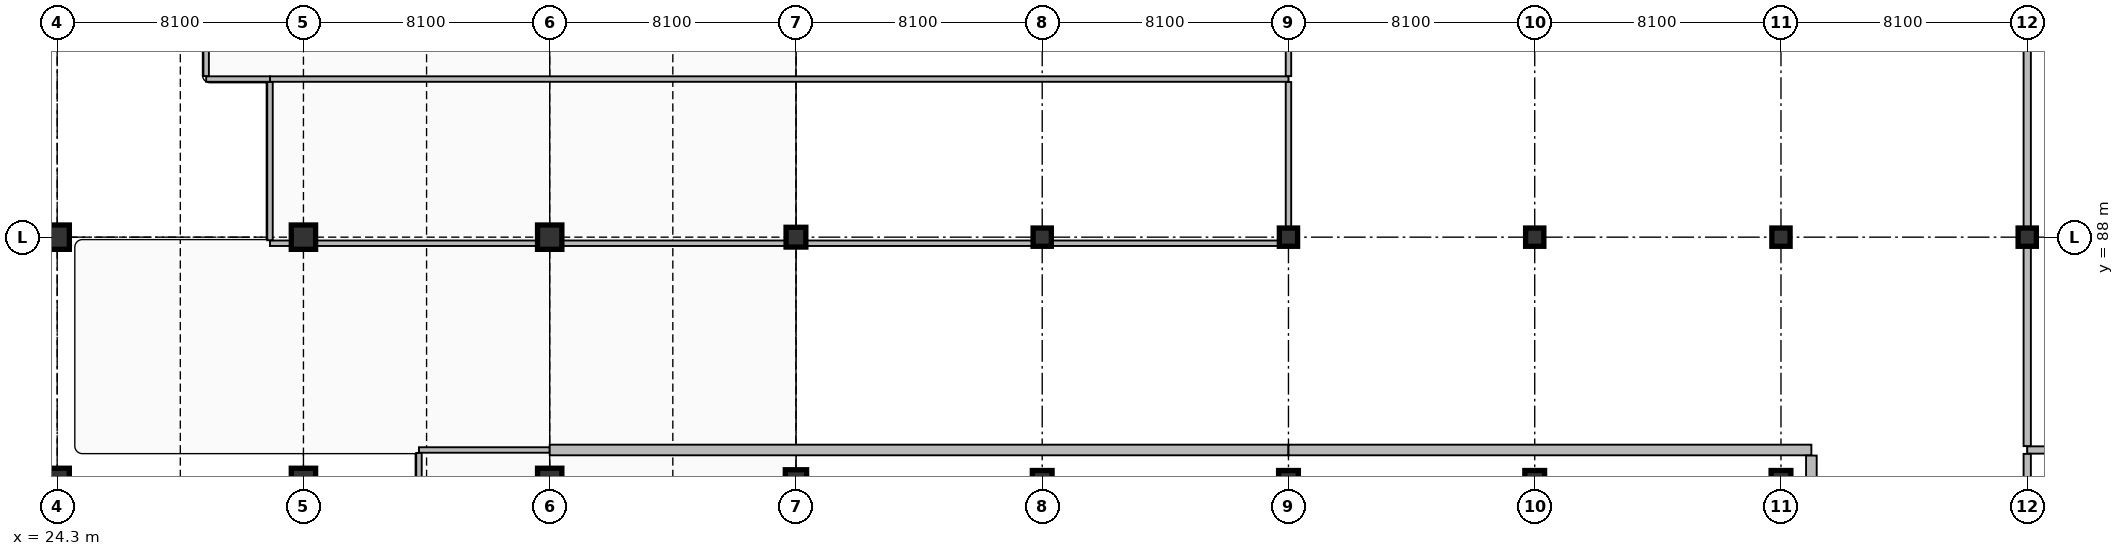
"""IFC4 building model, lengths in metres.
Left out: names, types, materials, properties, quantities, classifications, styles, units other than length and angle.
Written with IfcOpenShell. Run it as: python <this file> out.ifc"""

import sys

from ifc_helpers import new_model, si_unit, direction, frame, frame_2d, origin, origin_2d, place, context, subcontext, project, spatial, rectangle, extrude, element, fill, save


model = new_model("IFC4")
c1 = context("Model", 3, precision=1e-05, world=origin(), true_north=direction((0.0, 1.0)))
c2 = subcontext(c1, "Body", "Model", "MODEL_VIEW")
j1 = project(units=[si_unit("LENGTHUNIT", "METRE"), si_unit("PLANEANGLEUNIT", "RADIAN")], contexts=[c1])
p1 = place(None, origin())
s1 = spatial("IfcSite", under=j1, at=p1, CompositionType="ELEMENT")
p2 = place(p1, origin())
s2 = spatial("IfcBuilding", under=s1, at=p2, CompositionType="ELEMENT")
p3 = place(p2, frame((0.0, 0.0, -4.8)))
s3 = spatial("IfcBuildingStorey", under=s2, at=p3, CompositionType="ELEMENT", Elevation=-4.8)
for number, where, z_axis, x_axis in (
    (1, (24.3, 80.0, 0.0), (0.0, 0.0, 1.0), (1.0, 0.0, 0.0)),
    (2, (24.3, 88.0, 0.0), (0.0, 0.0, 1.0), (1.0, 0.0, 0.0)),
    (3, (32.4, 80.0, 0.0), (0.0, 0.0, 1.0), (1.0, 0.0, 0.0)),
    (4, (32.4, 88.0, 0.0), (0.0, 0.0, 1.0), (1.0, 0.0, 0.0)),
    (5, (40.5, 80.0, 0.0), (0.0, 0.0, 1.0), (1.0, 0.0, 0.0)),
    (6, (40.5, 88.0, 0.0), (0.0, 0.0, 1.0), (1.0, 0.0, 0.0)),
):
    element("IfcColumn", number, at=place(p3, frame(where, z_axis=z_axis, x_axis=x_axis)), inside=s3, PredefinedType="COLUMN", context=c2, shape_type="SweptSolid", body=[
        extrude(rectangle(XDim=0.8, YDim=0.8, at=origin_2d()), origin(), (0.0, 0.0, 1.0), 4.8),
    ])
p4 = place(p3, frame((48.6, 80.0, 0.0), z_axis=(0.0, 0.0, 1.0), x_axis=(1.0, 0.0, 0.0)))
e7 = element("IfcColumn", 7, at=p4, inside=s3, PredefinedType="COLUMN", context=c2, shape_type="SweptSolid", body=[
    extrude(rectangle(XDim=0.7, YDim=0.7, at=origin_2d()), origin(), (0.0, 0.0, 1.0), 4.8),
])
for number, where, z_axis, x_axis in (
    (8, (48.6, 88.0, 0.0), (0.0, 0.0, 1.0), (1.0, 0.0, 0.0)),
    (9, (56.7, 80.0, 0.0), (0.0, 0.0, 1.0), (1.0, 0.0, 0.0)),
):
    element("IfcColumn", number, at=place(p3, frame(where, z_axis=z_axis, x_axis=x_axis)), inside=s3, PredefinedType="COLUMN", context=c2, shape_type="SweptSolid", body=[
        extrude(rectangle(XDim=0.65, YDim=0.65, at=origin_2d()), origin(), (0.0, 0.0, 1.0), 4.8),
    ])
p5 = place(p3, frame((56.7, 88.0, 0.0), z_axis=(0.0, 0.0, 1.0), x_axis=(1.0, 0.0, 0.0)))
e10 = element("IfcColumn", 10, at=p5, inside=s3, PredefinedType="COLUMN", context=c2, shape_type="SweptSolid", body=[
    extrude(rectangle(XDim=0.6, YDim=0.6, at=origin_2d()), origin(), (0.0, 0.0, 1.0), 4.45),
])
p6 = place(p3, frame((64.8, 80.0, 0.0), z_axis=(0.0, 0.0, 1.0), x_axis=(1.0, 0.0, 0.0)))
e11 = element("IfcColumn", 11, at=p6, inside=s3, PredefinedType="COLUMN", context=c2, shape_type="SweptSolid", body=[
    extrude(rectangle(XDim=0.65, YDim=0.65, at=origin_2d()), origin(), (0.0, 0.0, 1.0), 4.8),
])
p7 = place(p3, frame((64.8, 88.0, 0.0), z_axis=(0.0, 0.0, 1.0), x_axis=(1.0, 0.0, 0.0)))
e12 = element("IfcColumn", 12, at=p7, inside=s3, PredefinedType="COLUMN", context=c2, shape_type="SweptSolid", body=[
    extrude(rectangle(XDim=0.6, YDim=0.6, at=origin_2d()), origin(), (0.0, 0.0, 1.0), 4.45),
])
p8 = place(p3, frame((72.9, 80.0, 0.0), z_axis=(0.0, 0.0, 1.0), x_axis=(1.0, 0.0, 0.0)))
e13 = element("IfcColumn", 13, at=p8, inside=s3, PredefinedType="COLUMN", context=c2, shape_type="SweptSolid", body=[
    extrude(rectangle(XDim=0.65, YDim=0.65, at=origin_2d()), origin(), (0.0, 0.0, 1.0), 4.8),
])
p9 = place(p3, frame((72.9, 88.0, 0.0), z_axis=(0.0, 0.0, 1.0), x_axis=(1.0, 0.0, 0.0)))
e14 = element("IfcColumn", 14, at=p9, inside=s3, PredefinedType="COLUMN", context=c2, shape_type="SweptSolid", body=[
    extrude(rectangle(XDim=0.6, YDim=0.6, at=origin_2d()), origin(), (0.0, 0.0, 1.0), 4.45),
])
p10 = place(p3, frame((81.0, 80.0, 0.0), z_axis=(0.0, 0.0, 1.0), x_axis=(1.0, 0.0, 0.0)))
e15 = element("IfcColumn", 15, at=p10, inside=s3, PredefinedType="COLUMN", context=c2, shape_type="SweptSolid", body=[
    extrude(rectangle(XDim=0.65, YDim=0.65, at=origin_2d()), origin(), (0.0, 0.0, 1.0), 4.8),
])
for number, where, z_axis, x_axis in (
    (16, (81.0, 88.0, 0.0), (0.0, 0.0, 1.0), (1.0, 0.0, 0.0)),
    (17, (89.1, 88.0, 0.0), (0.0, 0.0, 1.0), (1.0, 0.0, 0.0)),
):
    element("IfcColumn", number, at=place(p3, frame(where, z_axis=z_axis, x_axis=x_axis)), inside=s3, PredefinedType="COLUMN", context=c2, shape_type="SweptSolid", body=[
        extrude(rectangle(XDim=0.6, YDim=0.6, at=origin_2d()), origin(), (0.0, 0.0, 1.0), 4.45),
    ])
p11 = place(p3, frame((29.2, 93.2, 0.0), z_axis=(0.0, 0.0, 1.0), x_axis=(1.0, 0.0, 0.0)))
e18 = element("IfcWall", 18, at=p11, inside=s3, PredefinedType="PARTITIONING", context=c2, shape_type="SweptSolid", body=[
    extrude(rectangle(XDim=2.1, YDim=0.18, at=frame_2d((1.05, 0.0))), origin(), (0.0, 0.0, 1.0), 4.45),
])
p12 = place(p3, frame((31.3, 87.8, 0.0), z_axis=(0.0, 0.0, 1.0), x_axis=(1.0, 0.0, 0.0)))
e19 = element("IfcWall", 19, at=p12, inside=s3, PredefinedType="PARTITIONING", context=c2, shape_type="SweptSolid", body=[
    extrude(rectangle(XDim=0.692, YDim=0.18, at=frame_2d((0.346, 0.0))), origin(), (0.0, 0.0, 1.0), 3.692),
])
p13 = place(p3, frame((32.808, 87.8, 0.0), z_axis=(0.0, 0.0, 1.0), x_axis=(1.0, 0.0, 0.0)))
e20 = element("IfcWall", 20, at=p13, inside=s3, PredefinedType="PARTITIONING", context=c2, shape_type="SweptSolid", body=[
    extrude(rectangle(XDim=7.284, YDim=0.18, at=frame_2d((3.642, 0.0))), origin(), (0.0, 0.0, 1.0), 3.642),
])
p14 = place(p3, frame((40.908, 87.8, 0.0), z_axis=(0.0, 0.0, 1.0), x_axis=(1.0, 0.0, 0.0)))
e21 = element("IfcWall", 21, at=p14, inside=s3, PredefinedType="PARTITIONING", context=c2, shape_type="SweptSolid", body=[
    extrude(rectangle(XDim=7.359, YDim=0.18, at=frame_2d((3.68, 0.0))), origin(), (0.0, 0.0, 1.0), 3.692),
])
p15 = place(p3, frame((48.933, 87.8, 0.0), z_axis=(0.0, 0.0, 1.0), x_axis=(1.0, 0.0, 0.0)))
e22 = element("IfcWall", 22, at=p15, inside=s3, PredefinedType="PARTITIONING", context=c2, shape_type="SweptSolid", body=[
    extrude(rectangle(XDim=7.459, YDim=0.18, at=frame_2d((3.729, 0.0))), origin(), (0.0, 0.0, 1.0), 4.45),
])
p16 = place(p3, frame((57.008, 87.8, 0.0), z_axis=(0.0, 0.0, 1.0), x_axis=(1.0, 0.0, 0.0)))
e23 = element("IfcWall", 23, at=p16, inside=s3, PredefinedType="PARTITIONING", context=c2, shape_type="SweptSolid", body=[
    extrude(rectangle(XDim=7.484, YDim=0.18, at=frame_2d((3.742, 0.0))), origin(), (0.0, 0.0, 1.0), 4.45),
])
p17 = place(p16, frame((3.192, 0.0, 0.0)))
e24 = element("IfcOpeningElement", 24, at=p17, cuts=e23, PredefinedType="OPENING", context=c2, shape_type="SweptSolid", body=[
    extrude(rectangle(XDim=1.1, YDim=2.2, at=frame_2d((0.55, 1.1))), frame((0.0, 0.1, 0.0), z_axis=(0.0, -1.0, 0.0), x_axis=(1.0, 0.0, 0.0)), (0.0, 0.0, 1.0), 0.2),
])
p18 = place(p3, frame((31.3, 93.2, 0.0), z_axis=(0.0, 0.0, 1.0), x_axis=(1.0, 0.0, 0.0)))
e25 = element("IfcWall", 25, at=p18, inside=s3, PredefinedType="PARTITIONING", context=c2, shape_type="SweptSolid", body=[
    extrude(rectangle(XDim=33.5, YDim=0.18, at=frame_2d((16.75, 0.0))), origin(), (0.0, 0.0, 1.0), 4.45),
])
p19 = place(p18, frame((16.15, 0.0, 0.0)))
e26 = element("IfcOpeningElement", 26, at=p19, cuts=e25, PredefinedType="OPENING", context=c2, shape_type="SweptSolid", body=[
    extrude(rectangle(XDim=1.2, YDim=2.2, at=frame_2d((0.6, 1.1))), frame((0.0, 0.1, 0.0), z_axis=(0.0, -1.0, 0.0), x_axis=(1.0, 0.0, 0.0)), (0.0, 0.0, 1.0), 0.2),
])
p20 = place(p3, frame((36.2, 81.0, 0.0), z_axis=(0.0, 0.0, 1.0), x_axis=(1.0, 0.0, 0.0)))
e27 = element("IfcWall", 27, at=p20, inside=s3, PredefinedType="PARTITIONING", context=c2, shape_type="SweptSolid", body=[
    extrude(rectangle(XDim=4.3, YDim=0.18, at=frame_2d((2.15, 0.0))), origin(), (0.0, 0.0, 1.0), 4.45),
])
p21 = place(p20, frame((1.55, 0.0, 0.0)))
e28 = element("IfcOpeningElement", 28, at=p21, cuts=e27, PredefinedType="OPENING", context=c2, shape_type="SweptSolid", body=[
    extrude(rectangle(XDim=1.2, YDim=2.2, at=frame_2d((0.6, 1.1))), frame((0.0, 0.1, 0.0), z_axis=(0.0, -1.0, 0.0), x_axis=(1.0, 0.0, 0.0)), (0.0, 0.0, 1.0), 0.2),
])
p22 = place(p3, frame((40.5, 81.0, 0.0), z_axis=(0.0, 0.0, 1.0), x_axis=(1.0, 0.0, 0.0)))
e29 = element("IfcWall", 29, at=p22, inside=s3, PredefinedType="SOLIDWALL", context=c2, shape_type="SweptSolid", body=[
    extrude(rectangle(XDim=24.3, YDim=0.35, at=frame_2d((12.15, 0.0))), origin(), (0.0, 0.0, 1.0), 4.45),
])
p23 = place(p22, frame((11.6, 0.0, 0.0)))
e30 = element("IfcOpeningElement", 30, at=p23, cuts=e29, PredefinedType="OPENING", context=c2, shape_type="SweptSolid", body=[
    extrude(rectangle(XDim=1.1, YDim=2.25, at=frame_2d((0.55, 1.125))), frame((0.0, 0.185, 0.0), z_axis=(0.0, -1.0, 0.0), x_axis=(1.0, 0.0, 0.0)), (0.0, 0.0, 1.0), 0.37),
])
p24 = place(p3, frame((64.8, 81.0, 0.0), z_axis=(0.0, 0.0, 1.0), x_axis=(1.0, 0.0, 0.0)))
e31 = element("IfcWall", 31, at=p24, inside=s3, PredefinedType="SOLIDWALL", context=c2, shape_type="SweptSolid", body=[
    extrude(rectangle(XDim=17.2, YDim=0.35, at=frame_2d((8.6, 0.0))), origin(), (0.0, 0.0, 1.0), 4.45),
])
p25 = place(p24, frame((5.298, 0.0, 0.0)))
e32 = element("IfcOpeningElement", 32, at=p25, cuts=e31, PredefinedType="OPENING", context=c2, shape_type="SweptSolid", body=[
    extrude(rectangle(XDim=1.1, YDim=2.25, at=frame_2d((0.55, 1.125))), frame((0.0, 0.185, 0.0), z_axis=(0.0, -1.0, 0.0), x_axis=(1.0, 0.0, 0.0)), (0.0, 0.0, 1.0), 0.37),
])
p26 = place(p3, frame((89.1, 81.0, 0.0), z_axis=(0.0, 0.0, 1.0), x_axis=(1.0, 0.0, 0.0)))
e33 = element("IfcWall", 33, at=p26, inside=s3, PredefinedType="PARTITIONING", context=c2, shape_type="SweptSolid", body=[
    extrude(rectangle(XDim=23.9, YDim=0.24, at=frame_2d((11.95, 0.0))), origin(), (0.0, 0.0, 1.0), 4.45),
])
p27 = place(p26, frame((11.4, 0.0, 0.0)))
e34 = element("IfcOpeningElement", 34, at=p27, cuts=e33, PredefinedType="OPENING", context=c2, shape_type="SweptSolid", body=[
    extrude(rectangle(XDim=1.1, YDim=2.25, at=frame_2d((0.55, 1.125))), frame((0.0, 0.13, 0.0), z_axis=(0.0, -1.0, 0.0), x_axis=(1.0, 0.0, 0.0)), (0.0, 0.0, 1.0), 0.26),
])
p28 = place(p3, frame((29.2, 93.298, 0.0), z_axis=(0.0, 0.0, 1.0), x_axis=(0.0, 1.0, 0.0)))
e35 = element("IfcWall", 35, at=p28, inside=s3, PredefinedType="PARTITIONING", context=c2, shape_type="SweptSolid", body=[
    extrude(rectangle(XDim=3.404, YDim=0.18, at=frame_2d((1.702, 0.0))), origin(), (0.0, 0.0, 1.0), 4.45),
])
p29 = place(p3, frame((31.3, 87.898, 0.0), z_axis=(0.0, 0.0, 1.0), x_axis=(0.0, 1.0, 0.0)))
e36 = element("IfcWall", 36, at=p29, inside=s3, PredefinedType="PARTITIONING", context=c2, shape_type="SweptSolid", body=[
    extrude(rectangle(XDim=5.204, YDim=0.18, at=frame_2d((2.602, 0.0))), origin(), (0.0, 0.0, 1.0), 4.45),
])
p30 = place(p3, frame((36.2, 74.895, 0.0), z_axis=(0.0, 0.0, 1.0), x_axis=(0.0, 1.0, 0.0)))
e37 = element("IfcWall", 37, at=p30, inside=s3, PredefinedType="PARTITIONING", context=c2, shape_type="SweptSolid", body=[
    extrude(rectangle(XDim=6.007, YDim=0.18, at=frame_2d((3.003, 0.0))), origin(), (0.0, 0.0, 1.0), 4.035),
])
p31 = place(p3, frame((64.8, 88.308, 0.0), z_axis=(0.0, 0.0, 1.0), x_axis=(0.0, 1.0, 0.0)))
e38 = element("IfcWall", 38, at=p31, inside=s3, PredefinedType="PARTITIONING", context=c2, shape_type="SweptSolid", body=[
    extrude(rectangle(XDim=4.794, YDim=0.18, at=frame_2d((2.397, 0.0))), origin(), (0.0, 0.0, 1.0), 4.45),
])
p32 = place(p3, frame((64.8, 93.298, 0.0), z_axis=(0.0, 0.0, 1.0), x_axis=(0.0, 1.0, 0.0)))
e39 = element("IfcWall", 39, at=p32, inside=s3, PredefinedType="PARTITIONING", context=c2, shape_type="SweptSolid", body=[
    extrude(rectangle(XDim=2.274, YDim=0.18, at=frame_2d((1.137, 0.0))), origin(), (0.0, 0.0, 1.0), 4.45),
])
p33 = place(p3, frame((82.0, 73.939, 0.0), z_axis=(0.0, 0.0, 1.0), x_axis=(0.0, 1.0, 0.0)))
e40 = element("IfcWall", 40, at=p33, inside=s3, PredefinedType="SOLIDWALL", context=c2, shape_type="SweptSolid", body=[
    extrude(rectangle(XDim=6.878, YDim=0.35, at=frame_2d((3.439, 0.0))), origin(), (0.0, 0.0, 1.0), 4.45),
])
p34 = place(p3, frame((89.1, 74.9, 0.0), z_axis=(0.0, 0.0, 1.0), x_axis=(0.0, 1.0, 0.0)))
e41 = element("IfcWall", 41, at=p34, inside=s3, PredefinedType="PARTITIONING", context=c2, shape_type="SweptSolid", body=[
    extrude(rectangle(XDim=5.972, YDim=0.24, at=frame_2d((2.986, 0.0))), origin(), (0.0, 0.0, 1.0), 4.45),
])
p35 = place(p3, frame((89.1, 81.128, 0.0), z_axis=(0.0, 0.0, 1.0), x_axis=(0.0, 1.0, 0.0)))
e42 = element("IfcWall", 42, at=p35, inside=s3, PredefinedType="PARTITIONING", context=c2, shape_type="SweptSolid", body=[
    extrude(rectangle(XDim=6.564, YDim=0.24, at=frame_2d((3.282, 0.0))), origin(), (0.0, 0.0, 1.0), 4.45),
])
p36 = place(p3, frame((89.1, 88.308, 0.0), z_axis=(0.0, 0.0, 1.0), x_axis=(0.0, 1.0, 0.0)))
e43 = element("IfcWall", 43, at=p36, inside=s3, PredefinedType="PARTITIONING", context=c2, shape_type="SweptSolid", body=[
    extrude(rectangle(XDim=7.264, YDim=0.24, at=frame_2d((3.632, 0.0))), origin(), (0.0, 0.0, 1.0), 4.45),
])
p37 = place(p17, origin())
e44 = element("IfcDoor", 44, at=p37, inside=s3, OperationType="SINGLE_SWING_LEFT", PredefinedType="DOOR", context=c2, shape_type="SweptSolid", body=[
    extrude(rectangle(XDim=1.1, YDim=2.2, at=frame_2d((0.55, 1.1))), frame((0.0, 0.025, 0.0), z_axis=(0.0, -1.0, 0.0), x_axis=(1.0, 0.0, 0.0)), (0.0, 0.0, 1.0), 0.05),
])
fill(e24, e44)
p38 = place(p19, origin())
e45 = element("IfcDoor", 45, at=p38, inside=s3, OperationType="SINGLE_SWING_RIGHT", PredefinedType="DOOR", context=c2, shape_type="SweptSolid", body=[
    extrude(rectangle(XDim=1.2, YDim=2.2, at=frame_2d((0.6, 1.1))), frame((0.0, 0.025, 0.0), z_axis=(0.0, -1.0, 0.0), x_axis=(1.0, 0.0, 0.0)), (0.0, 0.0, 1.0), 0.05),
])
fill(e26, e45)
p39 = place(p21, frame((1.2, 0.0, 0.0), z_axis=(0.0, 0.0, 1.0), x_axis=(-1.0, 0.0, 0.0)))
e46 = element("IfcDoor", 46, at=p39, inside=s3, OperationType="SINGLE_SWING_LEFT", PredefinedType="DOOR", context=c2, shape_type="SweptSolid", body=[
    extrude(rectangle(XDim=1.2, YDim=2.2, at=frame_2d((0.6, 1.1))), frame((0.0, 0.025, 0.0), z_axis=(0.0, -1.0, 0.0), x_axis=(1.0, 0.0, 0.0)), (0.0, 0.0, 1.0), 0.05),
])
fill(e28, e46)
p40 = place(p23, frame((1.1, 0.0, 0.0), z_axis=(0.0, 0.0, 1.0), x_axis=(-1.0, 0.0, 0.0)))
e47 = element("IfcDoor", 47, at=p40, inside=s3, OperationType="SINGLE_SWING_LEFT", PredefinedType="DOOR", context=c2, shape_type="SweptSolid", body=[
    extrude(rectangle(XDim=1.1, YDim=2.25, at=frame_2d((0.55, 1.125))), frame((0.0, 0.025, 0.0), z_axis=(0.0, -1.0, 0.0), x_axis=(1.0, 0.0, 0.0)), (0.0, 0.0, 1.0), 0.05),
])
fill(e30, e47)
p41 = place(p25, frame((1.1, 0.0, 0.0), z_axis=(0.0, 0.0, 1.0), x_axis=(-1.0, 0.0, 0.0)))
e48 = element("IfcDoor", 48, at=p41, inside=s3, OperationType="SINGLE_SWING_RIGHT", PredefinedType="DOOR", context=c2, shape_type="SweptSolid", body=[
    extrude(rectangle(XDim=1.1, YDim=2.25, at=frame_2d((0.55, 1.125))), frame((0.0, 0.025, 0.0), z_axis=(0.0, -1.0, 0.0), x_axis=(1.0, 0.0, 0.0)), (0.0, 0.0, 1.0), 0.05),
])
fill(e32, e48)
save(model, sys.argv[1])
